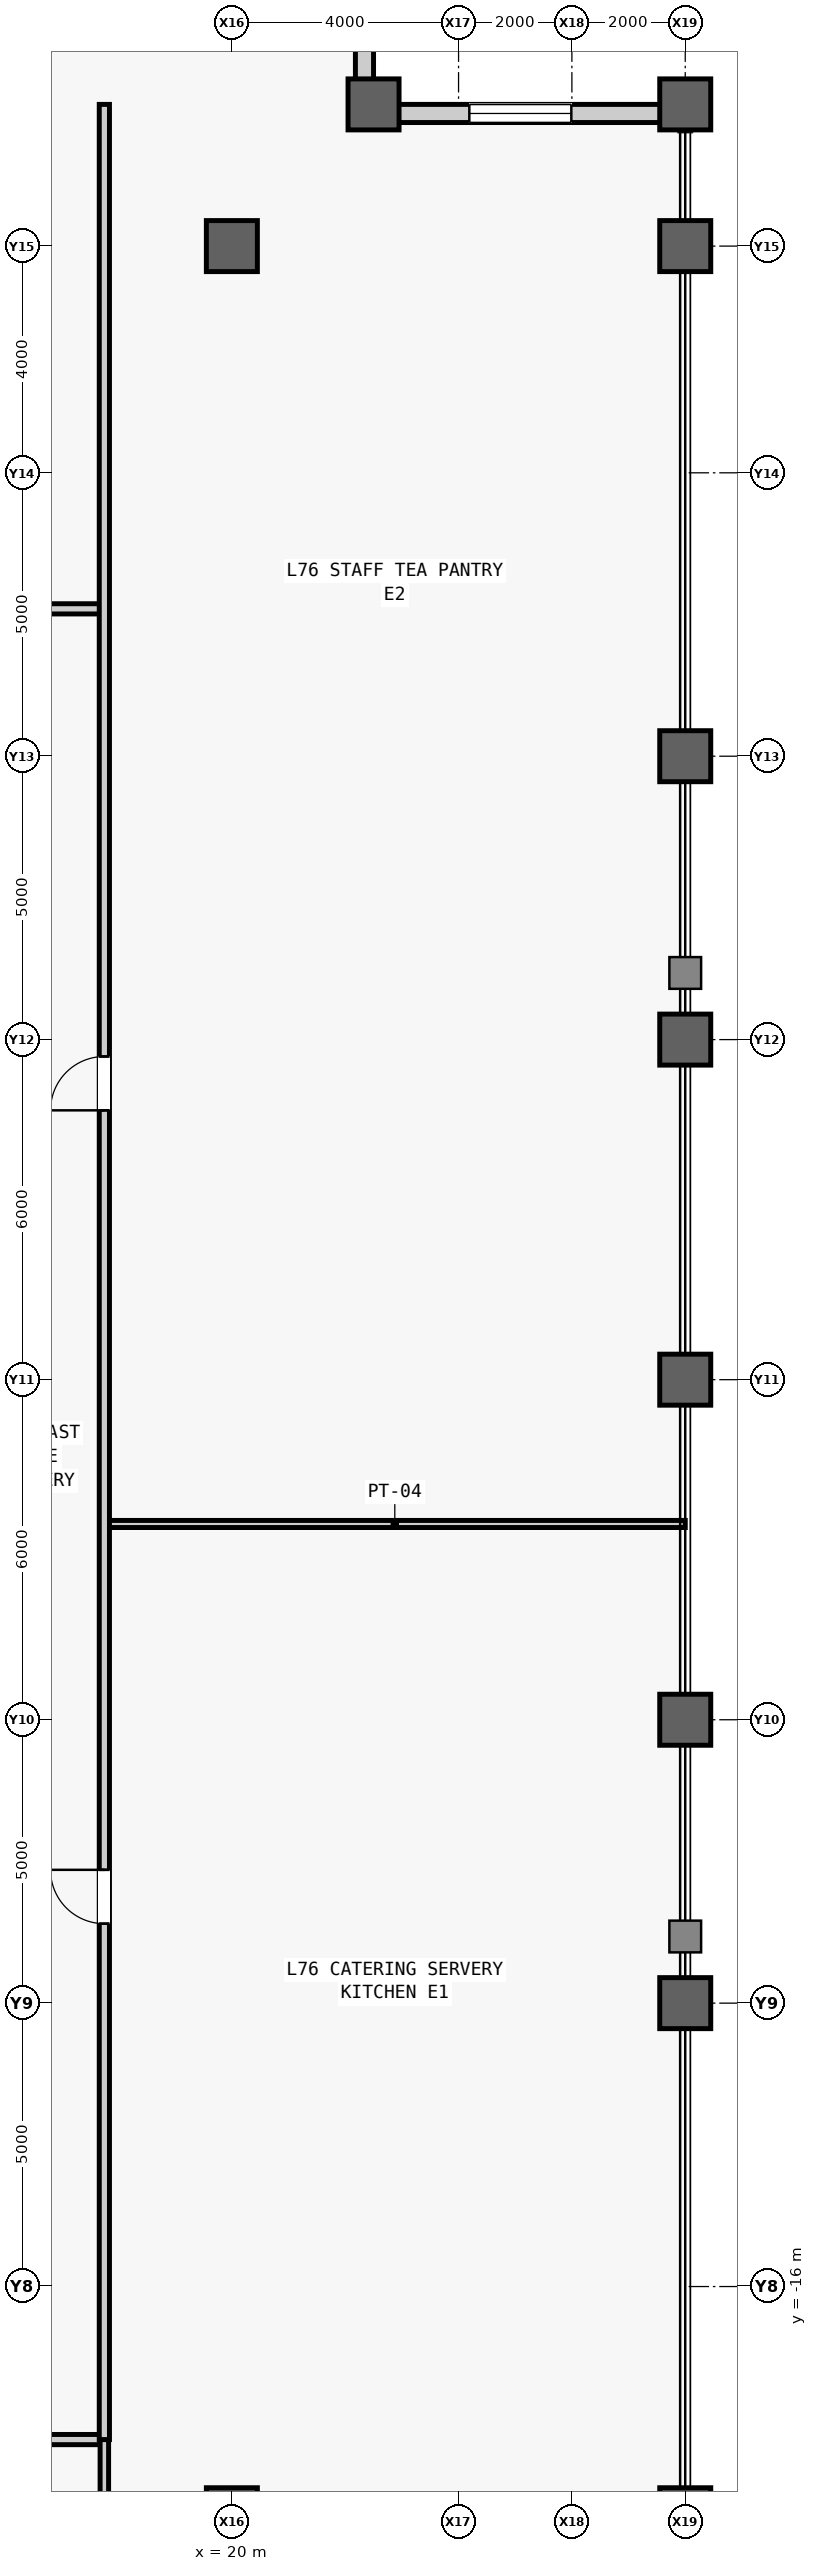
"""IFC4 building model, lengths in metres.
Left out: names, types, materials, properties, quantities, classifications, styles, units other than length and angle.
Written with IfcOpenShell. Run it as: python <this file> out.ifc"""

import sys

from ifc_helpers import new_model, si_unit, direction, frame, frame_2d, origin, origin_2d, place, context, subcontext, project, spatial, rectangle, hollow_rectangle, extrude, source, transform, mapped, element, fill, save


model = new_model("IFC4")
c1 = context("Model", 3, precision=1e-05, world=origin(), true_north=direction((0.0, 1.0)))
c2 = subcontext(c1, "Body", "Model", "MODEL_VIEW")
j1 = project(units=[si_unit("LENGTHUNIT", "METRE"), si_unit("PLANEANGLEUNIT", "RADIAN")], contexts=[c1])
p1 = place(None, origin())
s1 = spatial("IfcSite", under=j1, at=p1, CompositionType="ELEMENT")
p2 = place(p1, origin())
s2 = spatial("IfcBuilding", under=s1, at=p2, CompositionType="ELEMENT")
p3 = place(p2, frame((0.0, 0.0, 321.5)))
s3 = spatial("IfcBuildingStorey", under=s2, at=p3, CompositionType="ELEMENT", Elevation=321.5)
m1 = source(origin(), c2, "Body", "SweptSolid", [
    extrude(hollow_rectangle(XDim=0.9, YDim=0.9, WallThickness=0.05, at=origin_2d()), origin(), (0.0, 0.0, 1.0), 4.8),
])
for number, where, z_axis, x_axis in (
    (1, (20.0, -20.0, 0.0), (0.0, 0.0, 1.0), (1.0, 0.0, 0.0)),
    (2, (20.0, 20.0, 0.0), (0.0, 0.0, 1.0), (1.0, 0.0, 0.0)),
    (3, (22.5, 22.5, 0.0), (0.0, 0.0, 1.0), (1.0, 0.0, 0.0)),
    (4, (28.0, -20.0, 0.0), (0.0, 0.0, 1.0), (1.0, 0.0, 0.0)),
    (5, (28.0, -11.0, 0.0), (0.0, 0.0, 1.0), (1.0, 0.0, 0.0)),
    (6, (28.0, -6.0, 0.0), (0.0, 0.0, 1.0), (1.0, 0.0, 0.0)),
    (7, (28.0, 0.0, 0.0), (0.0, 0.0, 1.0), (1.0, 0.0, 0.0)),
    (8, (28.0, 6.0, 0.0), (0.0, 0.0, 1.0), (1.0, 0.0, 0.0)),
    (9, (28.0, 11.0, 0.0), (0.0, 0.0, 1.0), (1.0, 0.0, 0.0)),
    (10, (28.0, 20.0, 0.0), (0.0, 0.0, 1.0), (1.0, 0.0, 0.0)),
    (11, (28.0, 22.5, 0.0), (0.0, 0.0, 1.0), (1.0, 0.0, 0.0)),
):
    element("IfcColumn", number, at=place(p3, frame(where, z_axis=z_axis, x_axis=x_axis)), inside=s3, PredefinedType="COLUMN", context=c2, shape_type="MappedRepresentation", body=[
        mapped(m1, transform((0.0, 0.0, 0.0), scale=1.0)),
    ])
m2 = source(origin(), c2, "Body", "SweptSolid", [
    extrude(rectangle(XDim=5.18, YDim=0.32, at=frame_2d((2.59, 0.0))), origin(), (0.0, 0.0, 1.0), 3.991),
])
p4 = place(p3, frame((22.5, 22.34, 0.0), z_axis=(0.0, 0.0, 1.0), x_axis=(1.0, 0.0, 0.0)))
e12 = element("IfcWall", 12, at=p4, inside=s3, PredefinedType="STANDARD", context=c2, shape_type="MappedRepresentation", body=[
    mapped(m2, transform((0.0, 0.0, 0.0), scale=1.0)),
])
m3 = source(origin(), c2, "Body", "SweptSolid", [
    extrude(rectangle(XDim=1.8, YDim=2.4, at=frame_2d((0.9, 1.2))), frame((0.0, 0.17, 0.0), z_axis=(0.0, -1.0, 0.0), x_axis=(1.0, 0.0, 0.0)), (0.0, 0.0, 1.0), 0.34),
])
p5 = place(p4, frame((1.69, 0.0, 0.7)))
e13 = element("IfcOpeningElement", 13, at=p5, cuts=e12, PredefinedType="OPENING", context=c2, shape_type="MappedRepresentation", body=[
    mapped(m3, transform((0.0, 0.0, 0.0), scale=1.0)),
])
p6 = place(p3, frame((22.34, 22.5, 0.0), z_axis=(0.0, 0.0, 1.0), x_axis=(0.0, 1.0, 0.0)))
e14 = element("IfcWall", 14, at=p6, inside=s3, PredefinedType="STANDARD", context=c2, shape_type="MappedRepresentation", body=[
    mapped(m2, transform((0.0, 0.0, 0.0), scale=1.0)),
])
p7 = place(p6, frame((1.69, 0.0, 0.7)))
e15 = element("IfcOpeningElement", 15, at=p7, cuts=e14, PredefinedType="OPENING", context=c2, shape_type="MappedRepresentation", body=[
    mapped(m3, transform((0.0, 0.0, 0.0), scale=1.0)),
])
m4 = source(origin(), c2, "Body", "SweptSolid", [
    extrude(rectangle(XDim=2.4, YDim=0.18, at=frame_2d((1.2, 0.0))), origin(), (0.0, 0.0, 1.0), 4.54),
])
p8 = place(p3, frame((15.35, 13.6, 0.0), z_axis=(0.0, 0.0, 1.0), x_axis=(1.0, 0.0, 0.0)))
e16 = element("IfcWall", 16, at=p8, inside=s3, PredefinedType="PARTITIONING", context=c2, shape_type="MappedRepresentation", body=[
    mapped(m4, transform((0.0, 0.0, 0.0), scale=1.0)),
])
m5 = source(origin(), c2, "Body", "SweptSolid", [
    extrude(rectangle(XDim=37.55, YDim=0.18, at=frame_2d((18.775, 0.0))), origin(), (0.0, 0.0, 1.0), 4.54),
])
p9 = place(p3, frame((-19.8, -18.7, 0.0), z_axis=(0.0, 0.0, 1.0), x_axis=(1.0, 0.0, 0.0)))
e17 = element("IfcWall", 17, at=p9, inside=s3, PredefinedType="PARTITIONING", context=c2, shape_type="MappedRepresentation", body=[
    mapped(m5, transform((0.0, 0.0, 0.0), scale=1.0)),
])
m6 = source(origin(), c2, "Body", "SweptSolid", [
    extrude(rectangle(XDim=1.05, YDim=2.2, at=frame_2d((0.525, 1.1))), frame((0.0, 0.1, 0.0), z_axis=(0.0, -1.0, 0.0), x_axis=(1.0, 0.0, 0.0)), (0.0, 0.0, 1.0), 0.2),
])
p10 = place(p9, frame((6.734, 0.0, 0.0)))
e18 = element("IfcOpeningElement", 18, at=p10, cuts=e17, PredefinedType="OPENING", context=c2, shape_type="MappedRepresentation", body=[
    mapped(m6, transform((0.0, 0.0, 0.0), scale=1.0)),
])
p11 = place(p9, frame((19.376, 0.0, 0.0)))
e19 = element("IfcOpeningElement", 19, at=p11, cuts=e17, PredefinedType="OPENING", context=c2, shape_type="MappedRepresentation", body=[
    mapped(m6, transform((0.0, 0.0, 0.0), scale=1.0)),
])
p12 = place(p9, frame((30.867, 0.0, 0.0)))
e20 = element("IfcOpeningElement", 20, at=p12, cuts=e17, PredefinedType="OPENING", context=c2, shape_type="MappedRepresentation", body=[
    mapped(m6, transform((0.0, 0.0, 0.0), scale=1.0)),
])
m7 = source(origin(), c2, "Body", "SweptSolid", [
    extrude(rectangle(XDim=9.3, YDim=0.15, at=frame_2d((4.65, 0.0))), origin(), (0.0, 0.0, 1.0), 4.54),
])
p13 = place(p3, frame((17.75, -28.0, 0.0), z_axis=(0.0, 0.0, 1.0), x_axis=(0.0, 1.0, 0.0)))
e21 = element("IfcWall", 21, at=p13, inside=s3, PredefinedType="PARTITIONING", context=c2, shape_type="MappedRepresentation", body=[
    mapped(m7, transform((0.0, 0.0, 0.0), scale=1.0)),
])
m8 = source(origin(), c2, "Body", "SweptSolid", [
    extrude(rectangle(XDim=10.25, YDim=0.125, at=frame_2d((5.125, 0.0))), origin(), (0.0, 0.0, 1.0), 4.54),
])
p14 = place(p3, frame((17.75, -2.546, 0.0), z_axis=(0.0, 0.0, 1.0), x_axis=(1.0, 0.0, 0.0)))
e22 = element("IfcWall", 22, at=p14, inside=s3, PredefinedType="PARTITIONING", context=c2, shape_type="MappedRepresentation", body=[
    mapped(m8, transform((0.0, 0.0, 0.0), scale=1.0)),
])
m9 = source(origin(), c2, "Body", "SweptSolid", [
    extrude(rectangle(XDim=41.2, YDim=0.18, at=frame_2d((20.6, 0.0))), origin(), (0.0, 0.0, 1.0), 4.54),
])
p15 = place(p3, frame((17.75, -18.7, 0.0), z_axis=(0.0, 0.0, 1.0), x_axis=(0.0, 1.0, 0.0)))
e23 = element("IfcWall", 23, at=p15, inside=s3, PredefinedType="PARTITIONING", context=c2, shape_type="MappedRepresentation", body=[
    mapped(m9, transform((0.0, 0.0, 0.0), scale=1.0)),
])
m10 = source(origin(), c2, "Body", "SweptSolid", [
    extrude(rectangle(XDim=0.95, YDim=2.15, at=frame_2d((0.475, 1.075))), frame((0.0, 0.1, 0.0), z_axis=(0.0, -1.0, 0.0), x_axis=(1.0, 0.0, 0.0)), (0.0, 0.0, 1.0), 0.2),
])
p16 = place(p15, frame((9.102, 0.0, 0.0)))
e24 = element("IfcOpeningElement", 24, at=p16, cuts=e23, PredefinedType="OPENING", context=c2, shape_type="MappedRepresentation", body=[
    mapped(m10, transform((0.0, 0.0, 0.0), scale=1.0)),
])
p17 = place(p15, frame((23.452, 0.0, 0.0)))
e25 = element("IfcOpeningElement", 25, at=p17, cuts=e23, PredefinedType="OPENING", context=c2, shape_type="MappedRepresentation", body=[
    mapped(m10, transform((0.0, 0.0, 0.0), scale=1.0)),
])
m11 = source(origin(), c2, "Body", "SweptSolid", [
    extrude(rectangle(XDim=1.8, YDim=2.4, at=frame_2d((0.9, 1.2))), frame((0.0, 0.03, 0.0), z_axis=(0.0, -1.0, 0.0), x_axis=(1.0, 0.0, 0.0)), (0.0, 0.0, 1.0), 0.06),
])
p18 = place(p5, origin())
e26 = element("IfcWindow", 26, at=p18, inside=s3, PartitioningType="SINGLE_PANEL", PredefinedType="WINDOW", context=c2, shape_type="MappedRepresentation", body=[
    mapped(m11, transform((0.0, 0.0, 0.0), scale=1.0)),
])
fill(e13, e26)
m12 = source(origin(), c2, "Body", "SweptSolid", [
    extrude(rectangle(XDim=0.95, YDim=2.15, at=frame_2d((0.475, 1.075))), frame((0.0, 0.025, 0.0), z_axis=(0.0, -1.0, 0.0), x_axis=(1.0, 0.0, 0.0)), (0.0, 0.0, 1.0), 0.05),
])
p19 = place(p16, origin())
e27 = element("IfcDoor", 27, at=p19, inside=s3, OperationType="SINGLE_SWING_RIGHT", PredefinedType="DOOR", context=c2, shape_type="MappedRepresentation", body=[
    mapped(m12, transform((0.0, 0.0, 0.0), scale=1.0)),
])
fill(e24, e27)
p20 = place(p17, origin())
e28 = element("IfcDoor", 28, at=p20, inside=s3, OperationType="SINGLE_SWING_LEFT", PredefinedType="DOOR", context=c2, shape_type="MappedRepresentation", body=[
    mapped(m12, transform((0.0, 0.0, 0.0), scale=1.0)),
])
fill(e25, e28)
save(model, sys.argv[1])
